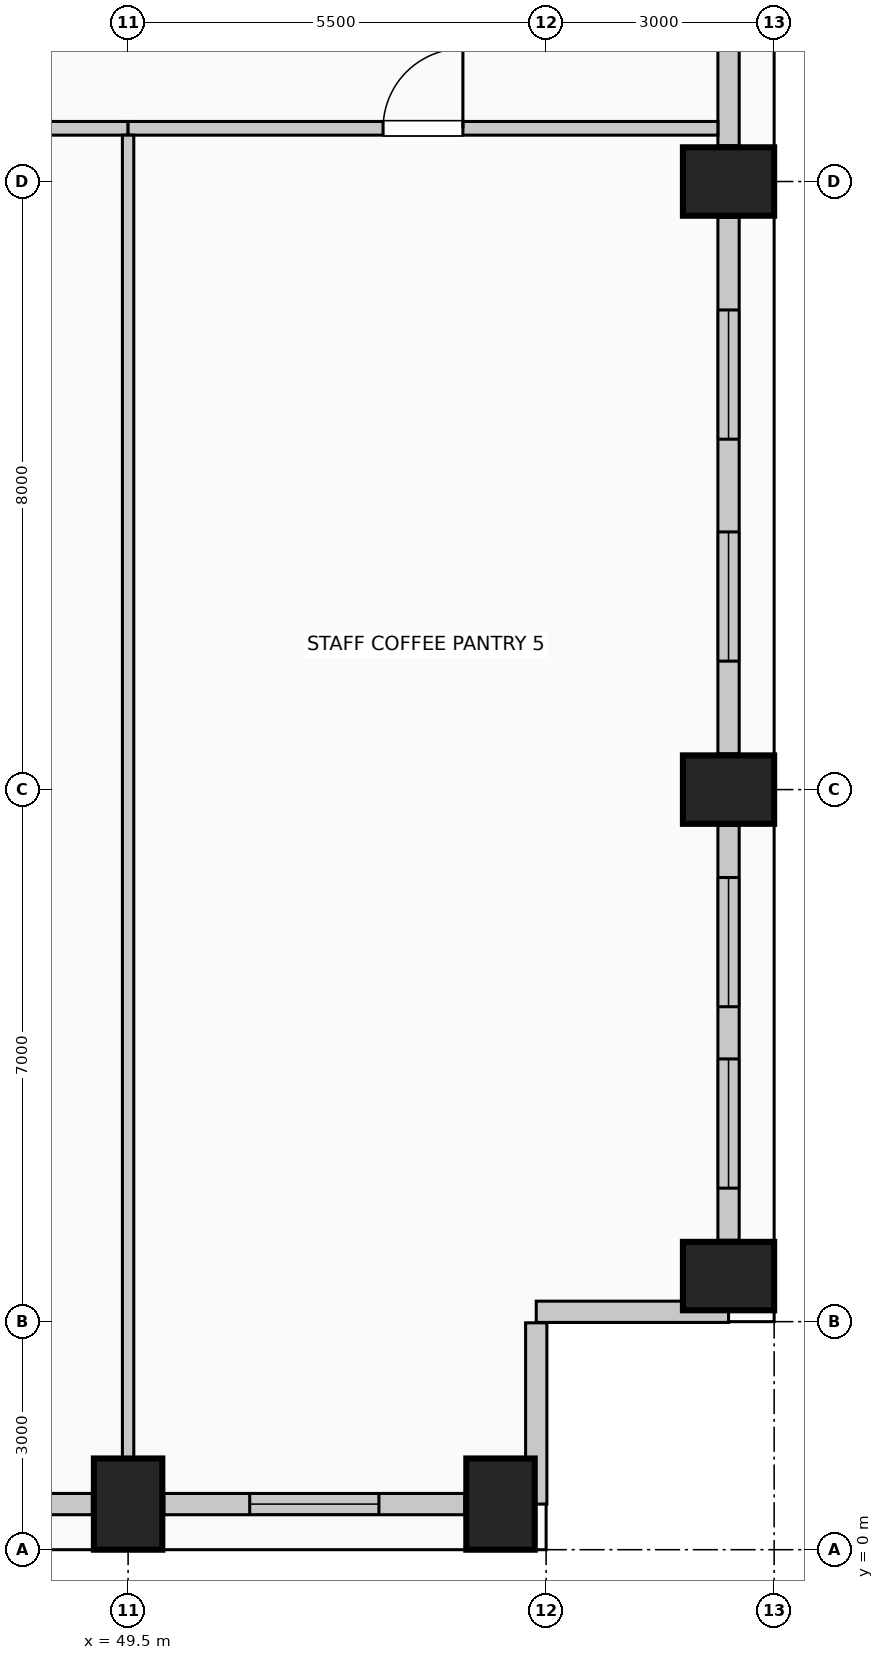
"""IFC4 building model, lengths in metres.
Left out: names, types, materials, properties, quantities, classifications, styles, units other than length and angle.
Written with IfcOpenShell. Run it as: python <this file> out.ifc"""

import sys

from ifc_helpers import new_model, si_unit, direction, frame, frame_2d, origin, origin_2d, place, context, subcontext, project, spatial, rectangle, extrude, element, fill, save


model = new_model("IFC4")
c1 = context("Model", 3, precision=1e-05, world=origin(), true_north=direction((0.0, 1.0)))
c2 = subcontext(c1, "Body", "Model", "MODEL_VIEW")
j1 = project(units=[si_unit("LENGTHUNIT", "METRE"), si_unit("PLANEANGLEUNIT", "RADIAN")], contexts=[c1])
p1 = place(None, origin())
s1 = spatial("IfcSite", under=j1, at=p1, CompositionType="ELEMENT")
p2 = place(p1, origin())
s2 = spatial("IfcBuilding", under=s1, at=p2, CompositionType="ELEMENT")
p3 = place(p2, frame((0.0, 0.0, 70.6)))
s3 = spatial("IfcBuildingStorey", under=s2, at=p3, CompositionType="ELEMENT", Elevation=70.6)
for number, where, z_axis, x_axis in (
    (1, (49.5, 0.6, 0.0), (0.0, 0.0, 1.0), (1.0, 0.0, 0.0)),
    (2, (54.4, 0.6, 0.0), (0.0, 0.0, 1.0), (1.0, 0.0, 0.0)),
    (3, (57.4, 3.6, 0.0), (0.0, 0.0, 1.0), (0.0, 1.0, 0.0)),
    (4, (57.4, 10.0, 0.0), (0.0, 0.0, 1.0), (0.0, 1.0, 0.0)),
    (5, (57.4, 18.0, 0.0), (0.0, 0.0, 1.0), (0.0, 1.0, 0.0)),
):
    element("IfcColumn", number, at=place(p3, frame(where, z_axis=z_axis, x_axis=x_axis)), inside=s3, PredefinedType="COLUMN", context=c2, shape_type="SweptSolid", body=[
        extrude(rectangle(XDim=0.9, YDim=1.2, at=origin_2d()), origin(), (0.0, 0.0, 1.0), 4.0),
    ])
p4 = place(p3, frame((49.03, 0.6, 0.0), z_axis=(0.0, 0.0, 1.0), x_axis=(-1.0, 0.0, 0.0)))
e6 = element("IfcWall", 6, at=p4, inside=s3, PredefinedType="SOLIDWALL", context=c2, shape_type="SweptSolid", body=[
    extrude(rectangle(XDim=4.56, YDim=0.28, at=frame_2d((2.28, 0.0))), origin(), (0.0, 0.0, 1.0), 2.85),
])
p5 = place(p3, frame((53.93, 0.6, 0.0), z_axis=(0.0, 0.0, 1.0), x_axis=(-1.0, 0.0, 0.0)))
e7 = element("IfcWall", 7, at=p5, inside=s3, PredefinedType="SOLIDWALL", context=c2, shape_type="SweptSolid", body=[
    extrude(rectangle(XDim=3.96, YDim=0.28, at=frame_2d((1.98, 0.0))), origin(), (0.0, 0.0, 1.0), 2.85),
])
p6 = place(p5, frame((1.13, 0.0, 0.5)))
e8 = element("IfcOpeningElement", 8, at=p6, cuts=e7, PredefinedType="OPENING", context=c2, shape_type="SweptSolid", body=[
    extrude(rectangle(XDim=1.7, YDim=1.95, at=frame_2d((0.85, 0.975))), frame((0.0, 0.15, 0.0), z_axis=(0.0, -1.0, 0.0), x_axis=(1.0, 0.0, 0.0)), (0.0, 0.0, 1.0), 0.3),
])
p7 = place(p3, frame((57.4, 9.53, 0.0), z_axis=(0.0, 0.0, 1.0), x_axis=(0.0, -1.0, 0.0)))
e9 = element("IfcWall", 9, at=p7, inside=s3, PredefinedType="SOLIDWALL", context=c2, shape_type="SweptSolid", body=[
    extrude(rectangle(XDim=5.46, YDim=0.28, at=frame_2d((2.73, 0.0))), origin(), (0.0, 0.0, 1.0), 2.85),
])
p8 = place(p7, frame((0.687, 0.0, 0.5)))
e10 = element("IfcOpeningElement", 10, at=p8, cuts=e9, PredefinedType="OPENING", context=c2, shape_type="SweptSolid", body=[
    extrude(rectangle(XDim=1.7, YDim=1.95, at=frame_2d((0.85, 0.975))), frame((0.0, 0.15, 0.0), z_axis=(0.0, -1.0, 0.0), x_axis=(1.0, 0.0, 0.0)), (0.0, 0.0, 1.0), 0.3),
])
p9 = place(p7, frame((3.073, 0.0, 0.5)))
e11 = element("IfcOpeningElement", 11, at=p9, cuts=e9, PredefinedType="OPENING", context=c2, shape_type="SweptSolid", body=[
    extrude(rectangle(XDim=1.7, YDim=1.95, at=frame_2d((0.85, 0.975))), frame((0.0, 0.15, 0.0), z_axis=(0.0, -1.0, 0.0), x_axis=(1.0, 0.0, 0.0)), (0.0, 0.0, 1.0), 0.3),
])
p10 = place(p3, frame((57.4, 17.53, 0.0), z_axis=(0.0, 0.0, 1.0), x_axis=(0.0, -1.0, 0.0)))
e12 = element("IfcWall", 12, at=p10, inside=s3, PredefinedType="SOLIDWALL", context=c2, shape_type="SweptSolid", body=[
    extrude(rectangle(XDim=7.06, YDim=0.28, at=frame_2d((3.53, 0.0))), origin(), (0.0, 0.0, 1.0), 2.85),
])
p11 = place(p10, frame((1.22, 0.0, 0.5)))
e13 = element("IfcOpeningElement", 13, at=p11, cuts=e12, PredefinedType="OPENING", context=c2, shape_type="SweptSolid", body=[
    extrude(rectangle(XDim=1.7, YDim=1.95, at=frame_2d((0.85, 0.975))), frame((0.0, 0.15, 0.0), z_axis=(0.0, -1.0, 0.0), x_axis=(1.0, 0.0, 0.0)), (0.0, 0.0, 1.0), 0.3),
])
p12 = place(p10, frame((4.14, 0.0, 0.5)))
e14 = element("IfcOpeningElement", 14, at=p12, cuts=e12, PredefinedType="OPENING", context=c2, shape_type="SweptSolid", body=[
    extrude(rectangle(XDim=1.7, YDim=1.95, at=frame_2d((0.85, 0.975))), frame((0.0, 0.15, 0.0), z_axis=(0.0, -1.0, 0.0), x_axis=(1.0, 0.0, 0.0)), (0.0, 0.0, 1.0), 0.3),
])
p13 = place(p3, frame((57.4, 25.53, 0.0), z_axis=(0.0, 0.0, 1.0), x_axis=(0.0, -1.0, 0.0)))
e15 = element("IfcWall", 15, at=p13, inside=s3, PredefinedType="SOLIDWALL", context=c2, shape_type="SweptSolid", body=[
    extrude(rectangle(XDim=7.06, YDim=0.28, at=frame_2d((3.53, 0.0))), origin(), (0.0, 0.0, 1.0), 2.85),
])
p14 = place(p3, frame((57.4, 3.13, 0.0), z_axis=(0.0, 0.0, 1.0), x_axis=(-1.0, 0.0, 0.0)))
e16 = element("IfcWall", 16, at=p14, inside=s3, PredefinedType="SOLIDWALL", context=c2, shape_type="SweptSolid", body=[
    extrude(rectangle(XDim=2.53, YDim=0.28, at=frame_2d((1.265, 0.0))), origin(), (0.0, 0.0, 1.0), 3.7),
])
p15 = place(p3, frame((54.87, 2.985, 0.0), z_axis=(0.0, 0.0, 1.0), x_axis=(0.0, -1.0, 0.0)))
e17 = element("IfcWall", 17, at=p15, inside=s3, PredefinedType="SOLIDWALL", context=c2, shape_type="SweptSolid", body=[
    extrude(rectangle(XDim=2.385, YDim=0.28, at=frame_2d((1.192, 0.0))), origin(), (0.0, 0.0, 1.0), 3.7),
])
p16 = place(p3, frame((35.2, 18.7, 0.0), z_axis=(0.0, 0.0, 1.0), x_axis=(1.0, 0.0, 0.0)))
e18 = element("IfcWall", 18, at=p16, inside=s3, PredefinedType="PARTITIONING", context=c2, shape_type="SweptSolid", body=[
    extrude(rectangle(XDim=14.3, YDim=0.18, at=frame_2d((7.15, 0.0))), origin(), (0.0, 0.0, 1.0), 3.7),
])
p17 = place(p16, frame((8.295, 0.0, 0.0)))
e19 = element("IfcOpeningElement", 19, at=p17, cuts=e18, PredefinedType="OPENING", context=c2, shape_type="SweptSolid", body=[
    extrude(rectangle(XDim=0.95, YDim=2.15, at=frame_2d((0.475, 1.075))), frame((0.0, 0.1, 0.0), z_axis=(0.0, -1.0, 0.0), x_axis=(1.0, 0.0, 0.0)), (0.0, 0.0, 1.0), 0.2),
])
p18 = place(p3, frame((49.5, 18.7, 0.0), z_axis=(0.0, 0.0, 1.0), x_axis=(1.0, 0.0, 0.0)))
e20 = element("IfcWall", 20, at=p18, inside=s3, PredefinedType="PARTITIONING", context=c2, shape_type="SweptSolid", body=[
    extrude(rectangle(XDim=7.76, YDim=0.18, at=frame_2d((3.88, 0.0))), origin(), (0.0, 0.0, 1.0), 3.7),
])
p19 = place(p18, frame((3.355, 0.0, 0.0)))
e21 = element("IfcOpeningElement", 21, at=p19, cuts=e20, PredefinedType="OPENING", context=c2, shape_type="SweptSolid", body=[
    extrude(rectangle(XDim=1.05, YDim=2.15, at=frame_2d((0.525, 1.075))), frame((0.0, 0.1, 0.0), z_axis=(0.0, -1.0, 0.0), x_axis=(1.0, 0.0, 0.0)), (0.0, 0.0, 1.0), 0.2),
])
p20 = place(p3, frame((49.5, 1.2, 0.0), z_axis=(0.0, 0.0, 1.0), x_axis=(0.0, 1.0, 0.0)))
e22 = element("IfcWall", 22, at=p20, inside=s3, PredefinedType="PARTITIONING", context=c2, shape_type="SweptSolid", body=[
    extrude(rectangle(XDim=17.41, YDim=0.15, at=frame_2d((8.705, 0.0))), origin(), (0.0, 0.0, 1.0), 3.7),
])
p21 = place(p6, origin())
e23 = element("IfcWindow", 23, at=p21, inside=s3, PartitioningType="SINGLE_PANEL", PredefinedType="WINDOW", context=c2, shape_type="SweptSolid", body=[
    extrude(rectangle(XDim=1.7, YDim=1.95, at=frame_2d((0.85, 0.975))), frame((0.0, 0.03, 0.0), z_axis=(0.0, -1.0, 0.0), x_axis=(1.0, 0.0, 0.0)), (0.0, 0.0, 1.0), 0.06),
])
fill(e8, e23)
p22 = place(p8, origin())
e24 = element("IfcWindow", 24, at=p22, inside=s3, PartitioningType="SINGLE_PANEL", PredefinedType="WINDOW", context=c2, shape_type="SweptSolid", body=[
    extrude(rectangle(XDim=1.7, YDim=1.95, at=frame_2d((0.85, 0.975))), frame((0.0, 0.03, 0.0), z_axis=(0.0, -1.0, 0.0), x_axis=(1.0, 0.0, 0.0)), (0.0, 0.0, 1.0), 0.06),
])
fill(e10, e24)
p23 = place(p9, origin())
e25 = element("IfcWindow", 25, at=p23, inside=s3, PartitioningType="SINGLE_PANEL", PredefinedType="WINDOW", context=c2, shape_type="SweptSolid", body=[
    extrude(rectangle(XDim=1.7, YDim=1.95, at=frame_2d((0.85, 0.975))), frame((0.0, 0.03, 0.0), z_axis=(0.0, -1.0, 0.0), x_axis=(1.0, 0.0, 0.0)), (0.0, 0.0, 1.0), 0.06),
])
fill(e11, e25)
p24 = place(p11, origin())
e26 = element("IfcWindow", 26, at=p24, inside=s3, PartitioningType="SINGLE_PANEL", PredefinedType="WINDOW", context=c2, shape_type="SweptSolid", body=[
    extrude(rectangle(XDim=1.7, YDim=1.95, at=frame_2d((0.85, 0.975))), frame((0.0, 0.03, 0.0), z_axis=(0.0, -1.0, 0.0), x_axis=(1.0, 0.0, 0.0)), (0.0, 0.0, 1.0), 0.06),
])
fill(e13, e26)
p25 = place(p12, origin())
e27 = element("IfcWindow", 27, at=p25, inside=s3, PartitioningType="SINGLE_PANEL", PredefinedType="WINDOW", context=c2, shape_type="SweptSolid", body=[
    extrude(rectangle(XDim=1.7, YDim=1.95, at=frame_2d((0.85, 0.975))), frame((0.0, 0.03, 0.0), z_axis=(0.0, -1.0, 0.0), x_axis=(1.0, 0.0, 0.0)), (0.0, 0.0, 1.0), 0.06),
])
fill(e14, e27)
p26 = place(p19, origin())
e28 = element("IfcDoor", 28, at=p26, inside=s3, OperationType="SINGLE_SWING_RIGHT", PredefinedType="DOOR", context=c2, shape_type="SweptSolid", body=[
    extrude(rectangle(XDim=1.05, YDim=2.15, at=frame_2d((0.525, 1.075))), frame((0.0, 0.025, 0.0), z_axis=(0.0, -1.0, 0.0), x_axis=(1.0, 0.0, 0.0)), (0.0, 0.0, 1.0), 0.05),
])
fill(e21, e28)
save(model, sys.argv[1])
